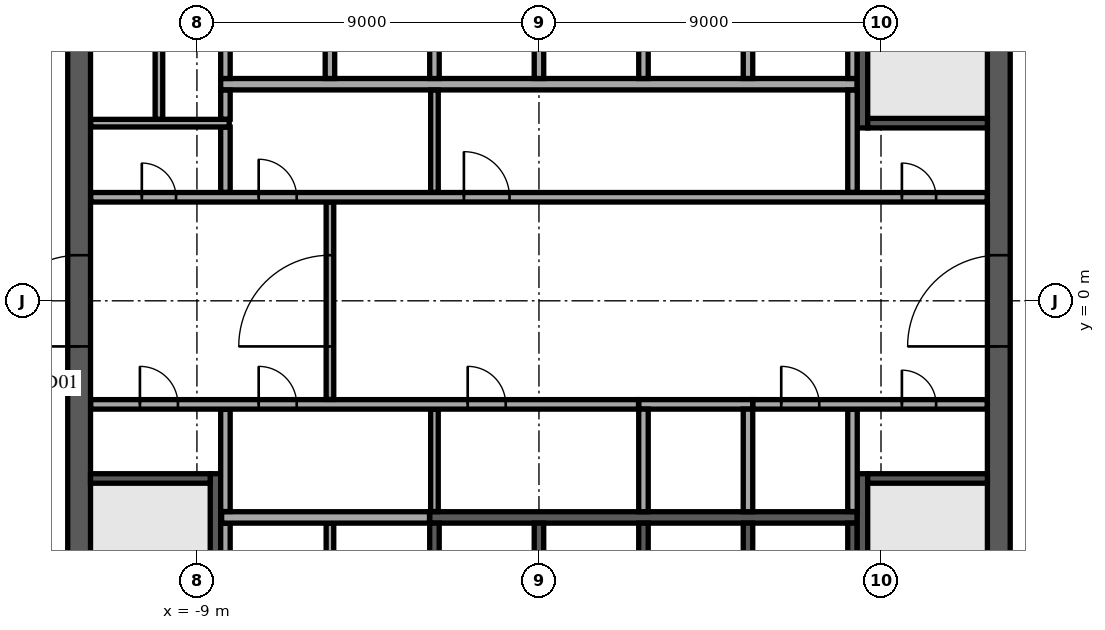
"""IFC4 building model, lengths in metres.
Left out: names, types, materials, properties, quantities, classifications, styles, units other than length and angle.
Written with IfcOpenShell. Run it as: python <this file> out.ifc"""

import sys

from ifc_helpers import new_model, si_unit, direction, frame, frame_2d, origin, place, context, subcontext, project, spatial, rectangle, extrude, element, fill, save


model = new_model("IFC4")
c1 = context("Model", 3, precision=1e-05, world=origin(), true_north=direction((0.0, 1.0)))
c2 = subcontext(c1, "Body", "Model", "MODEL_VIEW")
j1 = project(units=[si_unit("LENGTHUNIT", "METRE"), si_unit("PLANEANGLEUNIT", "RADIAN")], contexts=[c1])
p1 = place(None, origin())
s1 = spatial("IfcSite", under=j1, at=p1, CompositionType="ELEMENT")
p2 = place(p1, origin())
s2 = spatial("IfcBuilding", under=s1, at=p2, CompositionType="ELEMENT")
p3 = place(p2, frame((0.0, 0.0, 332.5)))
s3 = spatial("IfcBuildingStorey", under=s2, at=p3, CompositionType="ELEMENT", Elevation=332.5)
p4 = place(p3, frame((12.1, -11.8, 0.0), z_axis=(0.0, 0.0, 1.0), x_axis=(0.0, 1.0, 0.0)))
e1 = element("IfcWall", 1, at=p4, inside=s3, PredefinedType="SHEAR", context=c2, shape_type="SweptSolid", body=[
    extrude(rectangle(XDim=23.6, YDim=0.6, at=frame_2d((11.8, 0.0))), origin(), (0.0, 0.0, 1.0), 3.65),
])
p5 = place(p4, frame((10.6, 0.0, 0.0)))
e2 = element("IfcOpeningElement", 2, at=p5, cuts=e1, PredefinedType="OPENING", context=c2, shape_type="SweptSolid", body=[
    extrude(rectangle(XDim=2.4, YDim=2.4, at=frame_2d((1.2, 1.2))), frame((0.0, 0.31, 0.0), z_axis=(0.0, -1.0, 0.0), x_axis=(1.0, 0.0, 0.0)), (0.0, 0.0, 1.0), 0.62),
])
p6 = place(p3, frame((-12.1, -11.8, 0.0), z_axis=(0.0, 0.0, 1.0), x_axis=(0.0, 1.0, 0.0)))
e3 = element("IfcWall", 3, at=p6, inside=s3, PredefinedType="SHEAR", context=c2, shape_type="SweptSolid", body=[
    extrude(rectangle(XDim=23.6, YDim=0.6, at=frame_2d((11.8, 0.0))), origin(), (0.0, 0.0, 1.0), 3.65),
])
p7 = place(p6, frame((10.6, 0.0, 0.0)))
e4 = element("IfcOpeningElement", 4, at=p7, cuts=e3, PredefinedType="OPENING", context=c2, shape_type="SweptSolid", body=[
    extrude(rectangle(XDim=2.4, YDim=2.4, at=frame_2d((1.2, 1.2))), frame((0.0, 0.31, 0.0), z_axis=(0.0, -1.0, 0.0), x_axis=(1.0, 0.0, 0.0)), (0.0, 0.0, 1.0), 0.62),
])
p8 = place(p3, frame((-8.375, 5.7, 0.0), z_axis=(0.0, 0.0, 1.0), x_axis=(1.0, 0.0, 0.0)))
e5 = element("IfcWall", 5, at=p8, inside=s3, PredefinedType="SOLIDWALL", context=c2, shape_type="SweptSolid", body=[
    extrude(rectangle(XDim=16.75, YDim=0.3, at=frame_2d((8.375, 0.0))), origin(), (0.0, 0.0, 1.0), 3.65),
])
p9 = place(p3, frame((-2.875, -5.7, 0.0), z_axis=(0.0, 0.0, 1.0), x_axis=(1.0, 0.0, 0.0)))
e6 = element("IfcWall", 6, at=p9, inside=s3, PredefinedType="SOLIDWALL", context=c2, shape_type="SweptSolid", body=[
    extrude(rectangle(XDim=11.25, YDim=0.3, at=frame_2d((5.625, 0.0))), origin(), (0.0, 0.0, 1.0), 3.65),
])
for number, where, z_axis, x_axis in (
    (7, (-8.25, 5.85, 0.0), (0.0, 0.0, 1.0), (0.0, 1.0, 0.0)),
    (8, (-5.5, 5.85, 0.0), (0.0, 0.0, 1.0), (0.0, 1.0, 0.0)),
    (9, (-2.75, 5.85, 0.0), (0.0, 0.0, 1.0), (0.0, 1.0, 0.0)),
    (10, (0.0, 5.85, 0.0), (0.0, 0.0, 1.0), (0.0, 1.0, 0.0)),
    (11, (2.75, 5.85, 0.0), (0.0, 0.0, 1.0), (0.0, 1.0, 0.0)),
    (12, (5.5, 5.85, 0.0), (0.0, 0.0, 1.0), (0.0, 1.0, 0.0)),
    (13, (8.25, 5.85, 0.0), (0.0, 0.0, 1.0), (0.0, 1.0, 0.0)),
):
    element("IfcWall", number, at=place(p3, frame(where, z_axis=z_axis, x_axis=x_axis)), inside=s3, PredefinedType="SOLIDWALL", context=c2, shape_type="SweptSolid", body=[
        extrude(rectangle(XDim=2.7, YDim=0.25, at=frame_2d((1.35, 0.0))), origin(), (0.0, 0.0, 1.0), 3.65),
    ])
p10 = place(p3, frame((2.625, -2.725, 0.0), z_axis=(0.0, 0.0, 1.0), x_axis=(1.0, 0.0, 0.0)))
e14 = element("IfcWall", 14, at=p10, inside=s3, PredefinedType="SOLIDWALL", context=c2, shape_type="SweptSolid", body=[
    extrude(rectangle(XDim=3.0, YDim=0.25, at=frame_2d((1.5, 0.0))), origin(), (0.0, 0.0, 1.0), 3.65),
])
for number, where, z_axis, x_axis in (
    (15, (2.75, -5.55, 0.0), (0.0, 0.0, 1.0), (0.0, 1.0, 0.0)),
    (16, (5.5, -5.55, 0.0), (0.0, 0.0, 1.0), (0.0, 1.0, 0.0)),
    (17, (-2.75, -8.55, 0.0), (0.0, 0.0, 1.0), (0.0, 1.0, 0.0)),
    (18, (0.0, -8.55, 0.0), (0.0, 0.0, 1.0), (0.0, 1.0, 0.0)),
    (19, (2.75, -8.55, 0.0), (0.0, 0.0, 1.0), (0.0, 1.0, 0.0)),
    (20, (5.5, -8.55, 0.0), (0.0, 0.0, 1.0), (0.0, 1.0, 0.0)),
    (21, (8.25, -8.55, 0.0), (0.0, 0.0, 1.0), (0.0, 1.0, 0.0)),
):
    element("IfcWall", number, at=place(p3, frame(where, z_axis=z_axis, x_axis=x_axis)), inside=s3, PredefinedType="SOLIDWALL", context=c2, shape_type="SweptSolid", body=[
        extrude(rectangle(XDim=2.7, YDim=0.25, at=frame_2d((1.35, 0.0))), origin(), (0.0, 0.0, 1.0), 3.65),
    ])
p11 = place(p3, frame((8.512, 4.55, 0.0), z_axis=(0.0, 0.0, 1.0), x_axis=(0.0, 1.0, 0.0)))
e22 = element("IfcWall", 22, at=p11, inside=s3, PredefinedType="SOLIDWALL", context=c2, shape_type="SweptSolid", body=[
    extrude(rectangle(XDim=7.25, YDim=0.275, at=frame_2d((3.625, 0.0))), origin(), (0.0, 0.0, 1.0), 3.65),
])
p12 = place(p11, frame((6.0, 0.0, 0.0)))
e23 = element("IfcOpeningElement", 23, at=p12, cuts=e22, PredefinedType="OPENING", context=c2, shape_type="SweptSolid", body=[
    extrude(rectangle(XDim=1.0, YDim=2.1, at=frame_2d((0.5, 1.05))), frame((0.0, 0.147, 0.0), z_axis=(0.0, -1.0, 0.0), x_axis=(1.0, 0.0, 0.0)), (0.0, 0.0, 1.0), 0.295),
])
p13 = place(p3, frame((8.65, 4.675, 0.0), z_axis=(0.0, 0.0, 1.0), x_axis=(1.0, 0.0, 0.0)))
e24 = element("IfcWall", 24, at=p13, inside=s3, PredefinedType="SOLIDWALL", context=c2, shape_type="SweptSolid", body=[
    extrude(rectangle(XDim=3.15, YDim=0.25, at=frame_2d((1.575, 0.0))), origin(), (0.0, 0.0, 1.0), 3.65),
])
p14 = place(p3, frame((-8.512, -4.55, 0.0), z_axis=(0.0, 0.0, 1.0), x_axis=(0.0, -1.0, 0.0)))
e25 = element("IfcWall", 25, at=p14, inside=s3, PredefinedType="SOLIDWALL", context=c2, shape_type="SweptSolid", body=[
    extrude(rectangle(XDim=7.25, YDim=0.275, at=frame_2d((3.625, 0.0))), origin(), (0.0, 0.0, 1.0), 3.65),
])
p15 = place(p14, frame((6.0, 0.0, 0.0)))
e26 = element("IfcOpeningElement", 26, at=p15, cuts=e25, PredefinedType="OPENING", context=c2, shape_type="SweptSolid", body=[
    extrude(rectangle(XDim=1.0, YDim=2.1, at=frame_2d((0.5, 1.05))), frame((0.0, 0.147, 0.0), z_axis=(0.0, -1.0, 0.0), x_axis=(1.0, 0.0, 0.0)), (0.0, 0.0, 1.0), 0.295),
])
p16 = place(p3, frame((-8.65, -4.675, 0.0), z_axis=(0.0, 0.0, 1.0), x_axis=(-1.0, 0.0, 0.0)))
e27 = element("IfcWall", 27, at=p16, inside=s3, PredefinedType="SOLIDWALL", context=c2, shape_type="SweptSolid", body=[
    extrude(rectangle(XDim=3.15, YDim=0.25, at=frame_2d((1.575, 0.0))), origin(), (0.0, 0.0, 1.0), 3.65),
])
p17 = place(p3, frame((8.512, -4.55, 0.0), z_axis=(0.0, 0.0, 1.0), x_axis=(0.0, -1.0, 0.0)))
e28 = element("IfcWall", 28, at=p17, inside=s3, PredefinedType="SOLIDWALL", context=c2, shape_type="SweptSolid", body=[
    extrude(rectangle(XDim=7.25, YDim=0.275, at=frame_2d((3.625, 0.0))), origin(), (0.0, 0.0, 1.0), 3.65),
])
p18 = place(p17, frame((6.0, 0.0, 0.0)))
e29 = element("IfcOpeningElement", 29, at=p18, cuts=e28, PredefinedType="OPENING", context=c2, shape_type="SweptSolid", body=[
    extrude(rectangle(XDim=1.0, YDim=2.1, at=frame_2d((0.5, 1.05))), frame((0.0, 0.147, 0.0), z_axis=(0.0, -1.0, 0.0), x_axis=(1.0, 0.0, 0.0)), (0.0, 0.0, 1.0), 0.295),
])
p19 = place(p3, frame((8.65, -4.675, 0.0), z_axis=(0.0, 0.0, 1.0), x_axis=(1.0, 0.0, 0.0)))
e30 = element("IfcWall", 30, at=p19, inside=s3, PredefinedType="SOLIDWALL", context=c2, shape_type="SweptSolid", body=[
    extrude(rectangle(XDim=3.15, YDim=0.25, at=frame_2d((1.575, 0.0))), origin(), (0.0, 0.0, 1.0), 3.65),
])
p20 = place(p3, frame((-8.25, -8.545, 0.0), z_axis=(0.0, 0.0, 1.0), x_axis=(0.0, 1.0, 0.0)))
e31 = element("IfcWall", 31, at=p20, inside=s3, PredefinedType="PARTITIONING", context=c2, shape_type="SweptSolid", body=[
    extrude(rectangle(XDim=2.69, YDim=0.25, at=frame_2d((1.345, 0.0))), origin(), (0.0, 0.0, 1.0), 3.65),
])
p21 = place(p3, frame((-5.5, -8.545, 0.0), z_axis=(0.0, 0.0, 1.0), x_axis=(0.0, 1.0, 0.0)))
e32 = element("IfcWall", 32, at=p21, inside=s3, PredefinedType="PARTITIONING", context=c2, shape_type="SweptSolid", body=[
    extrude(rectangle(XDim=2.69, YDim=0.2, at=frame_2d((1.345, 0.0))), origin(), (0.0, 0.0, 1.0), 3.65),
])
p22 = place(p3, frame((-8.35, -5.7, 0.0), z_axis=(0.0, 0.0, 1.0), x_axis=(1.0, 0.0, 0.0)))
e33 = element("IfcWall", 33, at=p22, inside=s3, PredefinedType="PARTITIONING", context=c2, shape_type="SweptSolid", body=[
    extrude(rectangle(XDim=5.47, YDim=0.3, at=frame_2d((2.735, 0.0))), origin(), (0.0, 0.0, 1.0), 3.65),
])
p23 = place(p3, frame((-8.25, -5.545, 0.0), z_axis=(0.0, 0.0, 1.0), x_axis=(0.0, 1.0, 0.0)))
e34 = element("IfcWall", 34, at=p23, inside=s3, PredefinedType="PARTITIONING", context=c2, shape_type="SweptSolid", body=[
    extrude(rectangle(XDim=2.69, YDim=0.25, at=frame_2d((1.345, 0.0))), origin(), (0.0, 0.0, 1.0), 3.65),
])
p24 = place(p3, frame((-2.75, -5.545, 0.0), z_axis=(0.0, 0.0, 1.0), x_axis=(0.0, 1.0, 0.0)))
e35 = element("IfcWall", 35, at=p24, inside=s3, PredefinedType="PARTITIONING", context=c2, shape_type="SweptSolid", body=[
    extrude(rectangle(XDim=2.69, YDim=0.2, at=frame_2d((1.345, 0.0))), origin(), (0.0, 0.0, 1.0), 3.65),
])
p25 = place(p3, frame((8.25, -5.545, 0.0), z_axis=(0.0, 0.0, 1.0), x_axis=(0.0, 1.0, 0.0)))
e36 = element("IfcWall", 36, at=p25, inside=s3, PredefinedType="PARTITIONING", context=c2, shape_type="SweptSolid", body=[
    extrude(rectangle(XDim=2.69, YDim=0.25, at=frame_2d((1.345, 0.0))), origin(), (0.0, 0.0, 1.0), 3.65),
])
p26 = place(p3, frame((-11.795, -2.725, 0.0), z_axis=(0.0, 0.0, 1.0), x_axis=(1.0, 0.0, 0.0)))
e37 = element("IfcWall", 37, at=p26, inside=s3, PredefinedType="PARTITIONING", context=c2, shape_type="SweptSolid", body=[
    extrude(rectangle(XDim=14.415, YDim=0.25, at=frame_2d((7.208, 0.0))), origin(), (0.0, 0.0, 1.0), 3.65),
])
p27 = place(p26, frame((1.295, 0.0, 0.0)))
e38 = element("IfcOpeningElement", 38, at=p27, cuts=e37, PredefinedType="OPENING", context=c2, shape_type="SweptSolid", body=[
    extrude(rectangle(XDim=1.0, YDim=2.1, at=frame_2d((0.5, 1.05))), frame((0.0, 0.135, 0.0), z_axis=(0.0, -1.0, 0.0), x_axis=(1.0, 0.0, 0.0)), (0.0, 0.0, 1.0), 0.27),
])
p28 = place(p26, frame((4.42, 0.0, 0.0)))
e39 = element("IfcOpeningElement", 39, at=p28, cuts=e37, PredefinedType="OPENING", context=c2, shape_type="SweptSolid", body=[
    extrude(rectangle(XDim=1.0, YDim=2.1, at=frame_2d((0.5, 1.05))), frame((0.0, 0.135, 0.0), z_axis=(0.0, -1.0, 0.0), x_axis=(1.0, 0.0, 0.0)), (0.0, 0.0, 1.0), 0.27),
])
p29 = place(p26, frame((9.92, 0.0, 0.0)))
e40 = element("IfcOpeningElement", 40, at=p29, cuts=e37, PredefinedType="OPENING", context=c2, shape_type="SweptSolid", body=[
    extrude(rectangle(XDim=1.0, YDim=2.1, at=frame_2d((0.5, 1.05))), frame((0.0, 0.135, 0.0), z_axis=(0.0, -1.0, 0.0), x_axis=(1.0, 0.0, 0.0)), (0.0, 0.0, 1.0), 0.27),
])
p30 = place(p3, frame((5.63, -2.725, 0.0), z_axis=(0.0, 0.0, 1.0), x_axis=(1.0, 0.0, 0.0)))
e41 = element("IfcWall", 41, at=p30, inside=s3, PredefinedType="PARTITIONING", context=c2, shape_type="SweptSolid", body=[
    extrude(rectangle(XDim=6.165, YDim=0.25, at=frame_2d((3.083, 0.0))), origin(), (0.0, 0.0, 1.0), 3.65),
])
p31 = place(p30, frame((0.745, 0.0, 0.0)))
e42 = element("IfcOpeningElement", 42, at=p31, cuts=e41, PredefinedType="OPENING", context=c2, shape_type="SweptSolid", body=[
    extrude(rectangle(XDim=1.0, YDim=2.1, at=frame_2d((0.5, 1.05))), frame((0.0, 0.135, 0.0), z_axis=(0.0, -1.0, 0.0), x_axis=(1.0, 0.0, 0.0)), (0.0, 0.0, 1.0), 0.27),
])
p32 = place(p30, frame((3.92, 0.0, 0.0)))
e43 = element("IfcOpeningElement", 43, at=p32, cuts=e41, PredefinedType="OPENING", context=c2, shape_type="SweptSolid", body=[
    extrude(rectangle(XDim=0.9, YDim=2.1, at=frame_2d((0.45, 1.05))), frame((0.0, 0.135, 0.0), z_axis=(0.0, -1.0, 0.0), x_axis=(1.0, 0.0, 0.0)), (0.0, 0.0, 1.0), 0.27),
])
p33 = place(p3, frame((-5.5, -2.595, 0.0), z_axis=(0.0, 0.0, 1.0), x_axis=(0.0, 1.0, 0.0)))
e44 = element("IfcWall", 44, at=p33, inside=s3, PredefinedType="PARTITIONING", context=c2, shape_type="SweptSolid", body=[
    extrude(rectangle(XDim=5.19, YDim=0.2, at=frame_2d((2.595, 0.0))), origin(), (0.0, 0.0, 1.0), 3.65),
])
p34 = place(p33, frame((1.395, 0.0, 0.0)))
e45 = element("IfcOpeningElement", 45, at=p34, cuts=e44, PredefinedType="OPENING", context=c2, shape_type="SweptSolid", body=[
    extrude(rectangle(XDim=2.4, YDim=2.4, at=frame_2d((1.2, 1.2))), frame((0.0, 0.11, 0.0), z_axis=(0.0, -1.0, 0.0), x_axis=(1.0, 0.0, 0.0)), (0.0, 0.0, 1.0), 0.22),
])
p35 = place(p3, frame((-11.795, 2.725, 0.0), z_axis=(0.0, 0.0, 1.0), x_axis=(1.0, 0.0, 0.0)))
e46 = element("IfcWall", 46, at=p35, inside=s3, PredefinedType="PARTITIONING", context=c2, shape_type="SweptSolid", body=[
    extrude(rectangle(XDim=23.59, YDim=0.25, at=frame_2d((11.795, 0.0))), origin(), (0.0, 0.0, 1.0), 3.65),
])
p36 = place(p35, frame((21.345, 0.0, 0.0)))
e47 = element("IfcOpeningElement", 47, at=p36, cuts=e46, PredefinedType="OPENING", context=c2, shape_type="SweptSolid", body=[
    extrude(rectangle(XDim=0.9, YDim=2.1, at=frame_2d((0.45, 1.05))), frame((0.0, 0.135, 0.0), z_axis=(0.0, -1.0, 0.0), x_axis=(1.0, 0.0, 0.0)), (0.0, 0.0, 1.0), 0.27),
])
p37 = place(p35, frame((1.345, 0.0, 0.0)))
e48 = element("IfcOpeningElement", 48, at=p37, cuts=e46, PredefinedType="OPENING", context=c2, shape_type="SweptSolid", body=[
    extrude(rectangle(XDim=0.9, YDim=2.1, at=frame_2d((0.45, 1.05))), frame((0.0, 0.135, 0.0), z_axis=(0.0, -1.0, 0.0), x_axis=(1.0, 0.0, 0.0)), (0.0, 0.0, 1.0), 0.27),
])
p38 = place(p35, frame((4.42, 0.0, 0.0)))
e49 = element("IfcOpeningElement", 49, at=p38, cuts=e46, PredefinedType="OPENING", context=c2, shape_type="SweptSolid", body=[
    extrude(rectangle(XDim=1.0, YDim=2.1, at=frame_2d((0.5, 1.05))), frame((0.0, 0.135, 0.0), z_axis=(0.0, -1.0, 0.0), x_axis=(1.0, 0.0, 0.0)), (0.0, 0.0, 1.0), 0.27),
])
p39 = place(p35, frame((9.82, 0.0, 0.0)))
e50 = element("IfcOpeningElement", 50, at=p39, cuts=e46, PredefinedType="OPENING", context=c2, shape_type="SweptSolid", body=[
    extrude(rectangle(XDim=1.2, YDim=2.1, at=frame_2d((0.6, 1.05))), frame((0.0, 0.135, 0.0), z_axis=(0.0, -1.0, 0.0), x_axis=(1.0, 0.0, 0.0)), (0.0, 0.0, 1.0), 0.27),
])
p40 = place(p3, frame((-8.25, 2.855, 0.0), z_axis=(0.0, 0.0, 1.0), x_axis=(0.0, 1.0, 0.0)))
e51 = element("IfcWall", 51, at=p40, inside=s3, PredefinedType="PARTITIONING", context=c2, shape_type="SweptSolid", body=[
    extrude(rectangle(XDim=1.715, YDim=0.25, at=frame_2d((0.857, 0.0))), origin(), (0.0, 0.0, 1.0), 3.65),
])
p41 = place(p3, frame((-2.75, 2.855, 0.0), z_axis=(0.0, 0.0, 1.0), x_axis=(0.0, 1.0, 0.0)))
e52 = element("IfcWall", 52, at=p41, inside=s3, PredefinedType="PARTITIONING", context=c2, shape_type="SweptSolid", body=[
    extrude(rectangle(XDim=2.69, YDim=0.2, at=frame_2d((1.345, 0.0))), origin(), (0.0, 0.0, 1.0), 3.65),
])
p42 = place(p3, frame((8.25, 2.855, 0.0), z_axis=(0.0, 0.0, 1.0), x_axis=(0.0, 1.0, 0.0)))
e53 = element("IfcWall", 53, at=p42, inside=s3, PredefinedType="PARTITIONING", context=c2, shape_type="SweptSolid", body=[
    extrude(rectangle(XDim=2.69, YDim=0.25, at=frame_2d((1.345, 0.0))), origin(), (0.0, 0.0, 1.0), 3.65),
])
p43 = place(p3, frame((-11.795, 4.675, 0.0), z_axis=(0.0, 0.0, 1.0), x_axis=(1.0, 0.0, 0.0)))
e54 = element("IfcWall", 54, at=p43, inside=s3, PredefinedType="PARTITIONING", context=c2, shape_type="SweptSolid", body=[
    extrude(rectangle(XDim=3.645, YDim=0.2, at=frame_2d((1.823, 0.0))), origin(), (0.0, 0.0, 1.0), 3.65),
])
p44 = place(p3, frame((-10.0, 4.78, 0.0), z_axis=(0.0, 0.0, 1.0), x_axis=(0.0, 1.0, 0.0)))
e55 = element("IfcWall", 55, at=p44, inside=s3, PredefinedType="PARTITIONING", context=c2, shape_type="SweptSolid", body=[
    extrude(rectangle(XDim=7.015, YDim=0.2, at=frame_2d((3.507, 0.0))), origin(), (0.0, 0.0, 1.0), 3.65),
])
p45 = place(p44, frame((2.92, 0.0, 0.0)))
e56 = element("IfcOpeningElement", 56, at=p45, cuts=e55, PredefinedType="OPENING", context=c2, shape_type="SweptSolid", body=[
    extrude(rectangle(XDim=1.0, YDim=2.1, at=frame_2d((0.5, 1.05))), frame((0.0, 0.11, 0.0), z_axis=(0.0, -1.0, 0.0), x_axis=(1.0, 0.0, 0.0)), (0.0, 0.0, 1.0), 0.22),
])
p46 = place(p3, frame((-8.25, 4.78, 0.0), z_axis=(0.0, 0.0, 1.0), x_axis=(0.0, 1.0, 0.0)))
e57 = element("IfcWall", 57, at=p46, inside=s3, PredefinedType="PARTITIONING", context=c2, shape_type="SweptSolid", body=[
    extrude(rectangle(XDim=0.765, YDim=0.25, at=frame_2d((0.382, 0.0))), origin(), (0.0, 0.0, 1.0), 3.65),
])
p47 = place(p5, origin())
e58 = element("IfcDoor", 58, at=p47, inside=s3, OperationType="SINGLE_SWING_LEFT", PredefinedType="DOOR", context=c2, shape_type="SweptSolid", body=[
    extrude(rectangle(XDim=2.4, YDim=2.4, at=frame_2d((1.2, 1.2))), frame((0.0, 0.025, 0.0), z_axis=(0.0, -1.0, 0.0), x_axis=(1.0, 0.0, 0.0)), (0.0, 0.0, 1.0), 0.05),
])
fill(e2, e58)
p48 = place(p7, origin())
e59 = element("IfcDoor", 59, at=p48, inside=s3, OperationType="SINGLE_SWING_LEFT", PredefinedType="DOOR", context=c2, shape_type="SweptSolid", body=[
    extrude(rectangle(XDim=2.4, YDim=2.4, at=frame_2d((1.2, 1.2))), frame((0.0, 0.025, 0.0), z_axis=(0.0, -1.0, 0.0), x_axis=(1.0, 0.0, 0.0)), (0.0, 0.0, 1.0), 0.05),
])
fill(e4, e59)
p49 = place(p27, origin())
e60 = element("IfcDoor", 60, at=p49, inside=s3, OperationType="SINGLE_SWING_RIGHT", PredefinedType="DOOR", context=c2, shape_type="SweptSolid", body=[
    extrude(rectangle(XDim=1.0, YDim=2.1, at=frame_2d((0.5, 1.05))), frame((0.0, 0.025, 0.0), z_axis=(0.0, -1.0, 0.0), x_axis=(1.0, 0.0, 0.0)), (0.0, 0.0, 1.0), 0.05),
])
fill(e38, e60)
p50 = place(p31, origin())
e61 = element("IfcDoor", 61, at=p50, inside=s3, OperationType="SINGLE_SWING_RIGHT", PredefinedType="DOOR", context=c2, shape_type="SweptSolid", body=[
    extrude(rectangle(XDim=1.0, YDim=2.1, at=frame_2d((0.5, 1.05))), frame((0.0, 0.025, 0.0), z_axis=(0.0, -1.0, 0.0), x_axis=(1.0, 0.0, 0.0)), (0.0, 0.0, 1.0), 0.05),
])
fill(e42, e61)
p51 = place(p36, origin())
e62 = element("IfcDoor", 62, at=p51, inside=s3, OperationType="SINGLE_SWING_RIGHT", PredefinedType="DOOR", context=c2, shape_type="SweptSolid", body=[
    extrude(rectangle(XDim=0.9, YDim=2.1, at=frame_2d((0.45, 1.05))), frame((0.0, 0.025, 0.0), z_axis=(0.0, -1.0, 0.0), x_axis=(1.0, 0.0, 0.0)), (0.0, 0.0, 1.0), 0.05),
])
fill(e47, e62)
p52 = place(p32, origin())
e63 = element("IfcDoor", 63, at=p52, inside=s3, OperationType="SINGLE_SWING_RIGHT", PredefinedType="DOOR", context=c2, shape_type="SweptSolid", body=[
    extrude(rectangle(XDim=0.9, YDim=2.1, at=frame_2d((0.45, 1.05))), frame((0.0, 0.025, 0.0), z_axis=(0.0, -1.0, 0.0), x_axis=(1.0, 0.0, 0.0)), (0.0, 0.0, 1.0), 0.05),
])
fill(e43, e63)
p53 = place(p37, origin())
e64 = element("IfcDoor", 64, at=p53, inside=s3, OperationType="SINGLE_SWING_RIGHT", PredefinedType="DOOR", context=c2, shape_type="SweptSolid", body=[
    extrude(rectangle(XDim=0.9, YDim=2.1, at=frame_2d((0.45, 1.05))), frame((0.0, 0.025, 0.0), z_axis=(0.0, -1.0, 0.0), x_axis=(1.0, 0.0, 0.0)), (0.0, 0.0, 1.0), 0.05),
])
fill(e48, e64)
p54 = place(p38, origin())
e65 = element("IfcDoor", 65, at=p54, inside=s3, OperationType="SINGLE_SWING_RIGHT", PredefinedType="DOOR", context=c2, shape_type="SweptSolid", body=[
    extrude(rectangle(XDim=1.0, YDim=2.1, at=frame_2d((0.5, 1.05))), frame((0.0, 0.025, 0.0), z_axis=(0.0, -1.0, 0.0), x_axis=(1.0, 0.0, 0.0)), (0.0, 0.0, 1.0), 0.05),
])
fill(e49, e65)
p55 = place(p39, origin())
e66 = element("IfcDoor", 66, at=p55, inside=s3, OperationType="SINGLE_SWING_LEFT", PredefinedType="DOOR", context=c2, shape_type="SweptSolid", body=[
    extrude(rectangle(XDim=1.2, YDim=2.1, at=frame_2d((0.6, 1.05))), frame((0.0, 0.025, 0.0), z_axis=(0.0, -1.0, 0.0), x_axis=(1.0, 0.0, 0.0)), (0.0, 0.0, 1.0), 0.05),
])
fill(e50, e66)
p56 = place(p28, origin())
e67 = element("IfcDoor", 67, at=p56, inside=s3, OperationType="SINGLE_SWING_RIGHT", PredefinedType="DOOR", context=c2, shape_type="SweptSolid", body=[
    extrude(rectangle(XDim=1.0, YDim=2.1, at=frame_2d((0.5, 1.05))), frame((0.0, 0.025, 0.0), z_axis=(0.0, -1.0, 0.0), x_axis=(1.0, 0.0, 0.0)), (0.0, 0.0, 1.0), 0.05),
])
fill(e39, e67)
p57 = place(p29, origin())
e68 = element("IfcDoor", 68, at=p57, inside=s3, OperationType="SINGLE_SWING_RIGHT", PredefinedType="DOOR", context=c2, shape_type="SweptSolid", body=[
    extrude(rectangle(XDim=1.0, YDim=2.1, at=frame_2d((0.5, 1.05))), frame((0.0, 0.025, 0.0), z_axis=(0.0, -1.0, 0.0), x_axis=(1.0, 0.0, 0.0)), (0.0, 0.0, 1.0), 0.05),
])
fill(e40, e68)
p58 = place(p34, origin())
e69 = element("IfcDoor", 69, at=p58, inside=s3, OperationType="DOUBLE_DOOR_DOUBLE_SWING", PredefinedType="DOOR", context=c2, shape_type="SweptSolid", body=[
    extrude(rectangle(XDim=2.4, YDim=2.4, at=frame_2d((1.2, 1.2))), frame((0.0, 0.025, 0.0), z_axis=(0.0, -1.0, 0.0), x_axis=(1.0, 0.0, 0.0)), (0.0, 0.0, 1.0), 0.05),
])
fill(e45, e69)
save(model, sys.argv[1])
